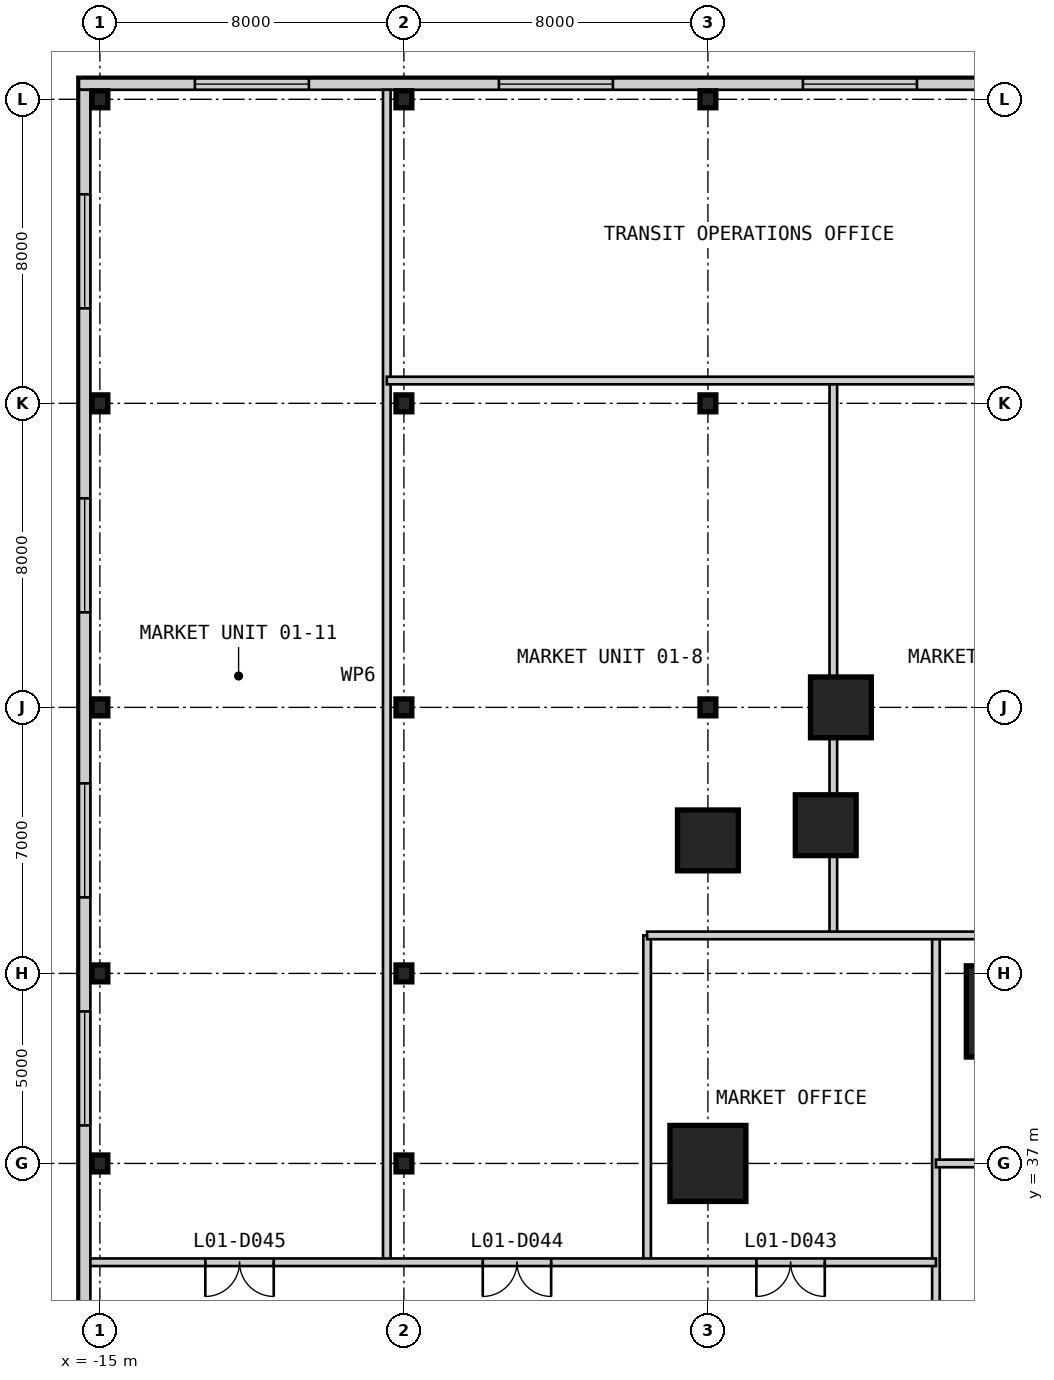
"""IFC4 building model, lengths in metres.
Left out: names, types, materials, properties, quantities, classifications, styles, units other than length and angle.
Written with IfcOpenShell. Run it as: python <this file> out.ifc"""

import sys

from ifc_helpers import new_model, si_unit, direction, frame, frame_2d, origin, origin_2d, place, context, subcontext, project, spatial, rectangle, i_section, extrude, element, fill, save


model = new_model("IFC4")
c1 = context("Model", 3, precision=1e-05, world=origin(), true_north=direction((0.0, 1.0)))
c2 = subcontext(c1, "Body", "Model", "MODEL_VIEW")
j1 = project(units=[si_unit("LENGTHUNIT", "METRE"), si_unit("PLANEANGLEUNIT", "RADIAN")], contexts=[c1])
p1 = place(None, origin())
s1 = spatial("IfcSite", under=j1, at=p1, CompositionType="ELEMENT")
p2 = place(p1, origin())
s2 = spatial("IfcBuilding", under=s1, at=p2, CompositionType="ELEMENT")
p3 = place(p2, frame((0.0, 0.0, 7.0)))
s3 = spatial("IfcBuildingStorey", under=s2, at=p3, CompositionType="ELEMENT", Elevation=7.0)
p4 = place(p3, frame((9.0, 41.0, 0.0), z_axis=(0.0, 0.0, 1.0), x_axis=(1.0, 0.0, 0.0)))
e1 = element("IfcColumn", 1, at=p4, inside=s3, PredefinedType="COLUMN", context=c2, shape_type="SweptSolid", body=[
    extrude(rectangle(XDim=2.4, YDim=2.4, at=origin_2d()), origin(), (0.0, 0.0, 1.0), 4.8),
])
for number, where, z_axis, x_axis in (
    (2, (4.5, 49.0, 0.0), (0.0, 0.0, 1.0), (1.0, 0.0, 0.0)),
    (3, (4.1, 45.9, 0.0), (0.0, 0.0, 1.0), (1.0, 0.0, 0.0)),
    (4, (1.0, 45.5, 0.0), (0.0, 0.0, 1.0), (1.0, 0.0, 0.0)),
):
    element("IfcColumn", number, at=place(p3, frame(where, z_axis=z_axis, x_axis=x_axis)), inside=s3, PredefinedType="COLUMN", context=c2, shape_type="SweptSolid", body=[
        extrude(rectangle(XDim=1.6, YDim=1.6, at=origin_2d()), origin(), (0.0, 0.0, 1.0), 4.8),
    ])
p5 = place(p3, frame((1.0, 37.0, 0.0), z_axis=(0.0, 0.0, 1.0), x_axis=(1.0, 0.0, 0.0)))
e5 = element("IfcColumn", 5, at=p5, inside=s3, PredefinedType="COLUMN", context=c2, shape_type="SweptSolid", body=[
    extrude(rectangle(XDim=2.0, YDim=2.0, at=origin_2d()), origin(), (0.0, 0.0, 1.0), 4.8),
])
for number, where, z_axis, x_axis in (
    (6, (-15.0, 37.0, 0.0), (0.0, 0.0, 1.0), (1.0, 0.0, 0.0)),
    (7, (-15.0, 42.0, 0.0), (0.0, 0.0, 1.0), (1.0, 0.0, 0.0)),
    (8, (-15.0, 49.0, 0.0), (0.0, 0.0, 1.0), (1.0, 0.0, 0.0)),
    (9, (-15.0, 57.0, 0.0), (0.0, 0.0, 1.0), (1.0, 0.0, 0.0)),
    (10, (-15.0, 65.0, 0.0), (0.0, 0.0, 1.0), (1.0, 0.0, 0.0)),
    (11, (-7.0, 37.0, 0.0), (0.0, 0.0, 1.0), (1.0, 0.0, 0.0)),
    (12, (-7.0, 42.0, 0.0), (0.0, 0.0, 1.0), (1.0, 0.0, 0.0)),
    (13, (-7.0, 49.0, 0.0), (0.0, 0.0, 1.0), (1.0, 0.0, 0.0)),
    (14, (-7.0, 57.0, 0.0), (0.0, 0.0, 1.0), (1.0, 0.0, 0.0)),
    (15, (-7.0, 65.0, 0.0), (0.0, 0.0, 1.0), (1.0, 0.0, 0.0)),
    (16, (1.0, 49.0, 0.0), (0.0, 0.0, 1.0), (1.0, 0.0, 0.0)),
    (17, (1.0, 57.0, 0.0), (0.0, 0.0, 1.0), (1.0, 0.0, 0.0)),
    (18, (1.0, 65.0, 0.0), (0.0, 0.0, 1.0), (1.0, 0.0, 0.0)),
):
    element("IfcColumn", number, at=place(p3, frame(where, z_axis=z_axis, x_axis=x_axis)), inside=s3, PredefinedType="COLUMN", context=c2, shape_type="SweptSolid", body=[
        extrude(i_section(OverallWidth=0.417, OverallDepth=0.445, WebThickness=0.039, FlangeThickness=0.063, at=origin_2d()), origin(), (0.0, 0.0, 1.0), 4.8),
    ])
p6 = place(p3, frame((65.55, 65.4, 0.0), z_axis=(0.0, 0.0, 1.0), x_axis=(-1.0, 0.0, 0.0)))
e19 = element("IfcWall", 19, at=p6, inside=s3, PredefinedType="SOLIDWALL", context=c2, shape_type="SweptSolid", body=[
    extrude(rectangle(XDim=81.1, YDim=0.3, at=frame_2d((40.55, 0.0))), origin(), (0.0, 0.0, 1.0), 4.5),
])
p7 = place(p6, frame((75.05, 0.0, 0.9)))
e20 = element("IfcOpeningElement", 20, at=p7, cuts=e19, PredefinedType="OPENING", context=c2, shape_type="SweptSolid", body=[
    extrude(rectangle(XDim=3.0, YDim=2.4, at=frame_2d((1.5, 1.2))), frame((0.0, 0.16, 0.0), z_axis=(0.0, -1.0, 0.0), x_axis=(1.0, 0.0, 0.0)), (0.0, 0.0, 1.0), 0.32),
])
p8 = place(p6, frame((67.05, 0.0, 0.9)))
e21 = element("IfcOpeningElement", 21, at=p8, cuts=e19, PredefinedType="OPENING", context=c2, shape_type="SweptSolid", body=[
    extrude(rectangle(XDim=3.0, YDim=2.4, at=frame_2d((1.5, 1.2))), frame((0.0, 0.16, 0.0), z_axis=(0.0, -1.0, 0.0), x_axis=(1.0, 0.0, 0.0)), (0.0, 0.0, 1.0), 0.32),
])
p9 = place(p6, frame((59.05, 0.0, 0.9)))
e22 = element("IfcOpeningElement", 22, at=p9, cuts=e19, PredefinedType="OPENING", context=c2, shape_type="SweptSolid", body=[
    extrude(rectangle(XDim=3.0, YDim=2.4, at=frame_2d((1.5, 1.2))), frame((0.0, 0.16, 0.0), z_axis=(0.0, -1.0, 0.0), x_axis=(1.0, 0.0, 0.0)), (0.0, 0.0, 1.0), 0.32),
])
p10 = place(p6, frame((45.05, 0.0, 0.9)))
e23 = element("IfcOpeningElement", 23, at=p10, cuts=e19, PredefinedType="OPENING", context=c2, shape_type="SweptSolid", body=[
    extrude(rectangle(XDim=3.0, YDim=2.4, at=frame_2d((1.5, 1.2))), frame((0.0, 0.16, 0.0), z_axis=(0.0, -1.0, 0.0), x_axis=(1.0, 0.0, 0.0)), (0.0, 0.0, 1.0), 0.32),
])
p11 = place(p6, frame((33.05, 0.0, 0.9)))
e24 = element("IfcOpeningElement", 24, at=p11, cuts=e19, PredefinedType="OPENING", context=c2, shape_type="SweptSolid", body=[
    extrude(rectangle(XDim=3.0, YDim=2.4, at=frame_2d((1.5, 1.2))), frame((0.0, 0.16, 0.0), z_axis=(0.0, -1.0, 0.0), x_axis=(1.0, 0.0, 0.0)), (0.0, 0.0, 1.0), 0.32),
])
p12 = place(p6, frame((24.55, 0.0, 0.9)))
e25 = element("IfcOpeningElement", 25, at=p12, cuts=e19, PredefinedType="OPENING", context=c2, shape_type="SweptSolid", body=[
    extrude(rectangle(XDim=3.0, YDim=2.4, at=frame_2d((1.5, 1.2))), frame((0.0, 0.16, 0.0), z_axis=(0.0, -1.0, 0.0), x_axis=(1.0, 0.0, 0.0)), (0.0, 0.0, 1.0), 0.32),
])
p13 = place(p6, frame((18.55, 0.0, 0.9)))
e26 = element("IfcOpeningElement", 26, at=p13, cuts=e19, PredefinedType="OPENING", context=c2, shape_type="SweptSolid", body=[
    extrude(rectangle(XDim=3.0, YDim=2.4, at=frame_2d((1.5, 1.2))), frame((0.0, 0.16, 0.0), z_axis=(0.0, -1.0, 0.0), x_axis=(1.0, 0.0, 0.0)), (0.0, 0.0, 1.0), 0.32),
])
p14 = place(p6, frame((11.05, 0.0, 0.9)))
e27 = element("IfcOpeningElement", 27, at=p14, cuts=e19, PredefinedType="OPENING", context=c2, shape_type="SweptSolid", body=[
    extrude(rectangle(XDim=3.0, YDim=2.4, at=frame_2d((1.5, 1.2))), frame((0.0, 0.16, 0.0), z_axis=(0.0, -1.0, 0.0), x_axis=(1.0, 0.0, 0.0)), (0.0, 0.0, 1.0), 0.32),
])
p15 = place(p6, frame((3.05, 0.0, 0.9)))
e28 = element("IfcOpeningElement", 28, at=p15, cuts=e19, PredefinedType="OPENING", context=c2, shape_type="SweptSolid", body=[
    extrude(rectangle(XDim=3.0, YDim=2.4, at=frame_2d((1.5, 1.2))), frame((0.0, 0.16, 0.0), z_axis=(0.0, -1.0, 0.0), x_axis=(1.0, 0.0, 0.0)), (0.0, 0.0, 1.0), 0.32),
])
p16 = place(p3, frame((-15.4, 65.25, 0.0), z_axis=(0.0, 0.0, 1.0), x_axis=(0.0, -1.0, 0.0)))
e29 = element("IfcWall", 29, at=p16, inside=s3, PredefinedType="SOLIDWALL", context=c2, shape_type="SweptSolid", body=[
    extrude(rectangle(XDim=80.5, YDim=0.3, at=frame_2d((40.25, 0.0))), origin(), (0.0, 0.0, 1.0), 4.5),
])
p17 = place(p16, frame((74.75, 0.0, 0.9)))
e30 = element("IfcOpeningElement", 30, at=p17, cuts=e29, PredefinedType="OPENING", context=c2, shape_type="SweptSolid", body=[
    extrude(rectangle(XDim=3.0, YDim=2.4, at=frame_2d((1.5, 1.2))), frame((0.0, 0.16, 0.0), z_axis=(0.0, -1.0, 0.0), x_axis=(1.0, 0.0, 0.0)), (0.0, 0.0, 1.0), 0.32),
])
p18 = place(p16, frame((66.75, 0.0, 0.9)))
e31 = element("IfcOpeningElement", 31, at=p18, cuts=e29, PredefinedType="OPENING", context=c2, shape_type="SweptSolid", body=[
    extrude(rectangle(XDim=3.0, YDim=2.4, at=frame_2d((1.5, 1.2))), frame((0.0, 0.16, 0.0), z_axis=(0.0, -1.0, 0.0), x_axis=(1.0, 0.0, 0.0)), (0.0, 0.0, 1.0), 0.32),
])
p19 = place(p16, frame((58.75, 0.0, 0.9)))
e32 = element("IfcOpeningElement", 32, at=p19, cuts=e29, PredefinedType="OPENING", context=c2, shape_type="SweptSolid", body=[
    extrude(rectangle(XDim=3.0, YDim=2.4, at=frame_2d((1.5, 1.2))), frame((0.0, 0.16, 0.0), z_axis=(0.0, -1.0, 0.0), x_axis=(1.0, 0.0, 0.0)), (0.0, 0.0, 1.0), 0.32),
])
p20 = place(p16, frame((44.75, 0.0, 0.9)))
e33 = element("IfcOpeningElement", 33, at=p20, cuts=e29, PredefinedType="OPENING", context=c2, shape_type="SweptSolid", body=[
    extrude(rectangle(XDim=3.0, YDim=2.4, at=frame_2d((1.5, 1.2))), frame((0.0, 0.16, 0.0), z_axis=(0.0, -1.0, 0.0), x_axis=(1.0, 0.0, 0.0)), (0.0, 0.0, 1.0), 0.32),
])
p21 = place(p16, frame((32.75, 0.0, 0.9)))
e34 = element("IfcOpeningElement", 34, at=p21, cuts=e29, PredefinedType="OPENING", context=c2, shape_type="SweptSolid", body=[
    extrude(rectangle(XDim=3.0, YDim=2.4, at=frame_2d((1.5, 1.2))), frame((0.0, 0.16, 0.0), z_axis=(0.0, -1.0, 0.0), x_axis=(1.0, 0.0, 0.0)), (0.0, 0.0, 1.0), 0.32),
])
p22 = place(p16, frame((24.25, 0.0, 0.9)))
e35 = element("IfcOpeningElement", 35, at=p22, cuts=e29, PredefinedType="OPENING", context=c2, shape_type="SweptSolid", body=[
    extrude(rectangle(XDim=3.0, YDim=2.4, at=frame_2d((1.5, 1.2))), frame((0.0, 0.16, 0.0), z_axis=(0.0, -1.0, 0.0), x_axis=(1.0, 0.0, 0.0)), (0.0, 0.0, 1.0), 0.32),
])
p23 = place(p16, frame((18.25, 0.0, 0.9)))
e36 = element("IfcOpeningElement", 36, at=p23, cuts=e29, PredefinedType="OPENING", context=c2, shape_type="SweptSolid", body=[
    extrude(rectangle(XDim=3.0, YDim=2.4, at=frame_2d((1.5, 1.2))), frame((0.0, 0.16, 0.0), z_axis=(0.0, -1.0, 0.0), x_axis=(1.0, 0.0, 0.0)), (0.0, 0.0, 1.0), 0.32),
])
p24 = place(p16, frame((10.75, 0.0, 0.9)))
e37 = element("IfcOpeningElement", 37, at=p24, cuts=e29, PredefinedType="OPENING", context=c2, shape_type="SweptSolid", body=[
    extrude(rectangle(XDim=3.0, YDim=2.4, at=frame_2d((1.5, 1.2))), frame((0.0, 0.16, 0.0), z_axis=(0.0, -1.0, 0.0), x_axis=(1.0, 0.0, 0.0)), (0.0, 0.0, 1.0), 0.32),
])
p25 = place(p16, frame((2.75, 0.0, 0.9)))
e38 = element("IfcOpeningElement", 38, at=p25, cuts=e29, PredefinedType="OPENING", context=c2, shape_type="SweptSolid", body=[
    extrude(rectangle(XDim=3.0, YDim=2.4, at=frame_2d((1.5, 1.2))), frame((0.0, 0.16, 0.0), z_axis=(0.0, -1.0, 0.0), x_axis=(1.0, 0.0, 0.0)), (0.0, 0.0, 1.0), 0.32),
])
p26 = place(p3, frame((-7.45, 34.4, 0.0), z_axis=(0.0, 0.0, 1.0), x_axis=(0.0, 1.0, 0.0)))
e39 = element("IfcWall", 39, at=p26, inside=s3, PredefinedType="PARTITIONING", context=c2, shape_type="SweptSolid", body=[
    extrude(rectangle(XDim=30.85, YDim=0.2, at=frame_2d((15.425, 0.0))), origin(), (0.0, 0.0, 1.0), 4.5),
])
p27 = place(p3, frame((-0.6, 34.4, 0.0), z_axis=(0.0, 0.0, 1.0), x_axis=(0.0, 1.0, 0.0)))
e40 = element("IfcWall", 40, at=p27, inside=s3, PredefinedType="PARTITIONING", context=c2, shape_type="SweptSolid", body=[
    extrude(rectangle(XDim=8.6, YDim=0.2, at=frame_2d((4.3, 0.0))), origin(), (0.0, 0.0, 1.0), 4.5),
])
p28 = place(p3, frame((4.3, 43.0, 0.0), z_axis=(0.0, 0.0, 1.0), x_axis=(0.0, 1.0, 0.0)))
e41 = element("IfcWall", 41, at=p28, inside=s3, PredefinedType="PARTITIONING", context=c2, shape_type="SweptSolid", body=[
    extrude(rectangle(XDim=2.1, YDim=0.2, at=frame_2d((1.05, 0.0))), origin(), (0.0, 0.0, 1.0), 4.5),
])
p29 = place(p3, frame((4.3, 46.7, 0.0), z_axis=(0.0, 0.0, 1.0), x_axis=(0.0, 1.0, 0.0)))
e42 = element("IfcWall", 42, at=p29, inside=s3, PredefinedType="PARTITIONING", context=c2, shape_type="SweptSolid", body=[
    extrude(rectangle(XDim=1.5, YDim=0.2, at=frame_2d((0.75, 0.0))), origin(), (0.0, 0.0, 1.0), 3.65),
])
p30 = place(p3, frame((4.3, 49.8, 0.0), z_axis=(0.0, 0.0, 1.0), x_axis=(0.0, 1.0, 0.0)))
e43 = element("IfcWall", 43, at=p30, inside=s3, PredefinedType="PARTITIONING", context=c2, shape_type="SweptSolid", body=[
    extrude(rectangle(XDim=7.8, YDim=0.2, at=frame_2d((3.9, 0.0))), origin(), (0.0, 0.0, 1.0), 4.5),
])
p31 = place(p3, frame((7.0, 22.0, 0.0), z_axis=(0.0, 0.0, 1.0), x_axis=(0.0, 1.0, 0.0)))
e44 = element("IfcWall", 44, at=p31, inside=s3, PredefinedType="PARTITIONING", context=c2, shape_type="SweptSolid", body=[
    extrude(rectangle(XDim=21.0, YDim=0.2, at=frame_2d((10.5, 0.0))), origin(), (0.0, 0.0, 1.0), 3.843),
])
p32 = place(p3, frame((-15.25, 34.4, 0.0), z_axis=(0.0, 0.0, 1.0), x_axis=(1.0, 0.0, 0.0)))
e45 = element("IfcWall", 45, at=p32, inside=s3, PredefinedType="PARTITIONING", context=c2, shape_type="SweptSolid", body=[
    extrude(rectangle(XDim=22.25, YDim=0.2, at=frame_2d((11.125, 0.0))), origin(), (0.0, 0.0, 1.0), 4.5),
])
p33 = place(p32, frame((17.525, 0.0, 0.0)))
e46 = element("IfcOpeningElement", 46, at=p33, cuts=e45, PredefinedType="OPENING", context=c2, shape_type="SweptSolid", body=[
    extrude(rectangle(XDim=1.8, YDim=2.4, at=frame_2d((0.9, 1.2))), frame((0.0, 0.11, 0.0), z_axis=(0.0, -1.0, 0.0), x_axis=(1.0, 0.0, 0.0)), (0.0, 0.0, 1.0), 0.22),
])
p34 = place(p32, frame((10.325, 0.0, 0.0)))
e47 = element("IfcOpeningElement", 47, at=p34, cuts=e45, PredefinedType="OPENING", context=c2, shape_type="SweptSolid", body=[
    extrude(rectangle(XDim=1.8, YDim=2.4, at=frame_2d((0.9, 1.2))), frame((0.0, 0.11, 0.0), z_axis=(0.0, -1.0, 0.0), x_axis=(1.0, 0.0, 0.0)), (0.0, 0.0, 1.0), 0.22),
])
p35 = place(p32, frame((3.025, 0.0, 0.0)))
e48 = element("IfcOpeningElement", 48, at=p35, cuts=e45, PredefinedType="OPENING", context=c2, shape_type="SweptSolid", body=[
    extrude(rectangle(XDim=1.8, YDim=2.4, at=frame_2d((0.9, 1.2))), frame((0.0, 0.11, 0.0), z_axis=(0.0, -1.0, 0.0), x_axis=(1.0, 0.0, 0.0)), (0.0, 0.0, 1.0), 0.22),
])
p36 = place(p3, frame((7.0, 37.0, 0.0), z_axis=(0.0, 0.0, 1.0), x_axis=(1.0, 0.0, 0.0)))
e49 = element("IfcWall", 49, at=p36, inside=s3, PredefinedType="PARTITIONING", context=c2, shape_type="SweptSolid", body=[
    extrude(rectangle(XDim=6.0, YDim=0.2, at=frame_2d((3.0, 0.0))), origin(), (0.0, 0.0, 1.0), 3.653),
])
p37 = place(p3, frame((-0.6, 43.0, 0.0), z_axis=(0.0, 0.0, 1.0), x_axis=(1.0, 0.0, 0.0)))
e50 = element("IfcWall", 50, at=p37, inside=s3, PredefinedType="PARTITIONING", context=c2, shape_type="SweptSolid", body=[
    extrude(rectangle(XDim=12.2, YDim=0.2, at=frame_2d((6.1, 0.0))), origin(), (0.0, 0.0, 1.0), 4.5),
])
p38 = place(p3, frame((-7.45, 57.6, 0.0), z_axis=(0.0, 0.0, 1.0), x_axis=(1.0, 0.0, 0.0)))
e51 = element("IfcWall", 51, at=p38, inside=s3, PredefinedType="PARTITIONING", context=c2, shape_type="SweptSolid", body=[
    extrude(rectangle(XDim=19.05, YDim=0.2, at=frame_2d((9.525, 0.0))), origin(), (0.0, 0.0, 1.0), 4.5),
])
p39 = place(p7, origin())
e52 = element("IfcWindow", 52, at=p39, inside=s3, PartitioningType="SINGLE_PANEL", PredefinedType="WINDOW", context=c2, shape_type="SweptSolid", body=[
    extrude(rectangle(XDim=3.0, YDim=2.4, at=frame_2d((1.5, 1.2))), frame((0.0, 0.03, 0.0), z_axis=(0.0, -1.0, 0.0), x_axis=(1.0, 0.0, 0.0)), (0.0, 0.0, 1.0), 0.06),
])
fill(e20, e52)
p40 = place(p8, origin())
e53 = element("IfcWindow", 53, at=p40, inside=s3, PartitioningType="SINGLE_PANEL", PredefinedType="WINDOW", context=c2, shape_type="SweptSolid", body=[
    extrude(rectangle(XDim=3.0, YDim=2.4, at=frame_2d((1.5, 1.2))), frame((0.0, 0.03, 0.0), z_axis=(0.0, -1.0, 0.0), x_axis=(1.0, 0.0, 0.0)), (0.0, 0.0, 1.0), 0.06),
])
fill(e21, e53)
p41 = place(p9, origin())
e54 = element("IfcWindow", 54, at=p41, inside=s3, PartitioningType="SINGLE_PANEL", PredefinedType="WINDOW", context=c2, shape_type="SweptSolid", body=[
    extrude(rectangle(XDim=3.0, YDim=2.4, at=frame_2d((1.5, 1.2))), frame((0.0, 0.03, 0.0), z_axis=(0.0, -1.0, 0.0), x_axis=(1.0, 0.0, 0.0)), (0.0, 0.0, 1.0), 0.06),
])
fill(e22, e54)
p42 = place(p22, origin())
e55 = element("IfcWindow", 55, at=p42, inside=s3, PartitioningType="SINGLE_PANEL", PredefinedType="WINDOW", context=c2, shape_type="SweptSolid", body=[
    extrude(rectangle(XDim=3.0, YDim=2.4, at=frame_2d((1.5, 1.2))), frame((0.0, 0.03, 0.0), z_axis=(0.0, -1.0, 0.0), x_axis=(1.0, 0.0, 0.0)), (0.0, 0.0, 1.0), 0.06),
])
fill(e35, e55)
p43 = place(p23, origin())
e56 = element("IfcWindow", 56, at=p43, inside=s3, PartitioningType="SINGLE_PANEL", PredefinedType="WINDOW", context=c2, shape_type="SweptSolid", body=[
    extrude(rectangle(XDim=3.0, YDim=2.4, at=frame_2d((1.5, 1.2))), frame((0.0, 0.03, 0.0), z_axis=(0.0, -1.0, 0.0), x_axis=(1.0, 0.0, 0.0)), (0.0, 0.0, 1.0), 0.06),
])
fill(e36, e56)
p44 = place(p24, origin())
e57 = element("IfcWindow", 57, at=p44, inside=s3, PartitioningType="SINGLE_PANEL", PredefinedType="WINDOW", context=c2, shape_type="SweptSolid", body=[
    extrude(rectangle(XDim=3.0, YDim=2.4, at=frame_2d((1.5, 1.2))), frame((0.0, 0.03, 0.0), z_axis=(0.0, -1.0, 0.0), x_axis=(1.0, 0.0, 0.0)), (0.0, 0.0, 1.0), 0.06),
])
fill(e37, e57)
p45 = place(p25, origin())
e58 = element("IfcWindow", 58, at=p45, inside=s3, PartitioningType="SINGLE_PANEL", PredefinedType="WINDOW", context=c2, shape_type="SweptSolid", body=[
    extrude(rectangle(XDim=3.0, YDim=2.4, at=frame_2d((1.5, 1.2))), frame((0.0, 0.03, 0.0), z_axis=(0.0, -1.0, 0.0), x_axis=(1.0, 0.0, 0.0)), (0.0, 0.0, 1.0), 0.06),
])
fill(e38, e58)
p46 = place(p33, frame((1.8, 0.0, 0.0), z_axis=(0.0, 0.0, 1.0), x_axis=(-1.0, 0.0, 0.0)))
e59 = element("IfcDoor", 59, at=p46, inside=s3, OperationType="DOUBLE_DOOR_SINGLE_SWING", PredefinedType="DOOR", context=c2, shape_type="SweptSolid", body=[
    extrude(rectangle(XDim=1.8, YDim=2.4, at=frame_2d((0.9, 1.2))), frame((0.0, 0.025, 0.0), z_axis=(0.0, -1.0, 0.0), x_axis=(1.0, 0.0, 0.0)), (0.0, 0.0, 1.0), 0.05),
])
fill(e46, e59)
p47 = place(p34, frame((1.8, 0.0, 0.0), z_axis=(0.0, 0.0, 1.0), x_axis=(-1.0, 0.0, 0.0)))
e60 = element("IfcDoor", 60, at=p47, inside=s3, OperationType="DOUBLE_DOOR_SINGLE_SWING", PredefinedType="DOOR", context=c2, shape_type="SweptSolid", body=[
    extrude(rectangle(XDim=1.8, YDim=2.4, at=frame_2d((0.9, 1.2))), frame((0.0, 0.025, 0.0), z_axis=(0.0, -1.0, 0.0), x_axis=(1.0, 0.0, 0.0)), (0.0, 0.0, 1.0), 0.05),
])
fill(e47, e60)
p48 = place(p35, frame((1.8, 0.0, 0.0), z_axis=(0.0, 0.0, 1.0), x_axis=(-1.0, 0.0, 0.0)))
e61 = element("IfcDoor", 61, at=p48, inside=s3, OperationType="DOUBLE_DOOR_SINGLE_SWING", PredefinedType="DOOR", context=c2, shape_type="SweptSolid", body=[
    extrude(rectangle(XDim=1.8, YDim=2.4, at=frame_2d((0.9, 1.2))), frame((0.0, 0.025, 0.0), z_axis=(0.0, -1.0, 0.0), x_axis=(1.0, 0.0, 0.0)), (0.0, 0.0, 1.0), 0.05),
])
fill(e48, e61)
save(model, sys.argv[1])
